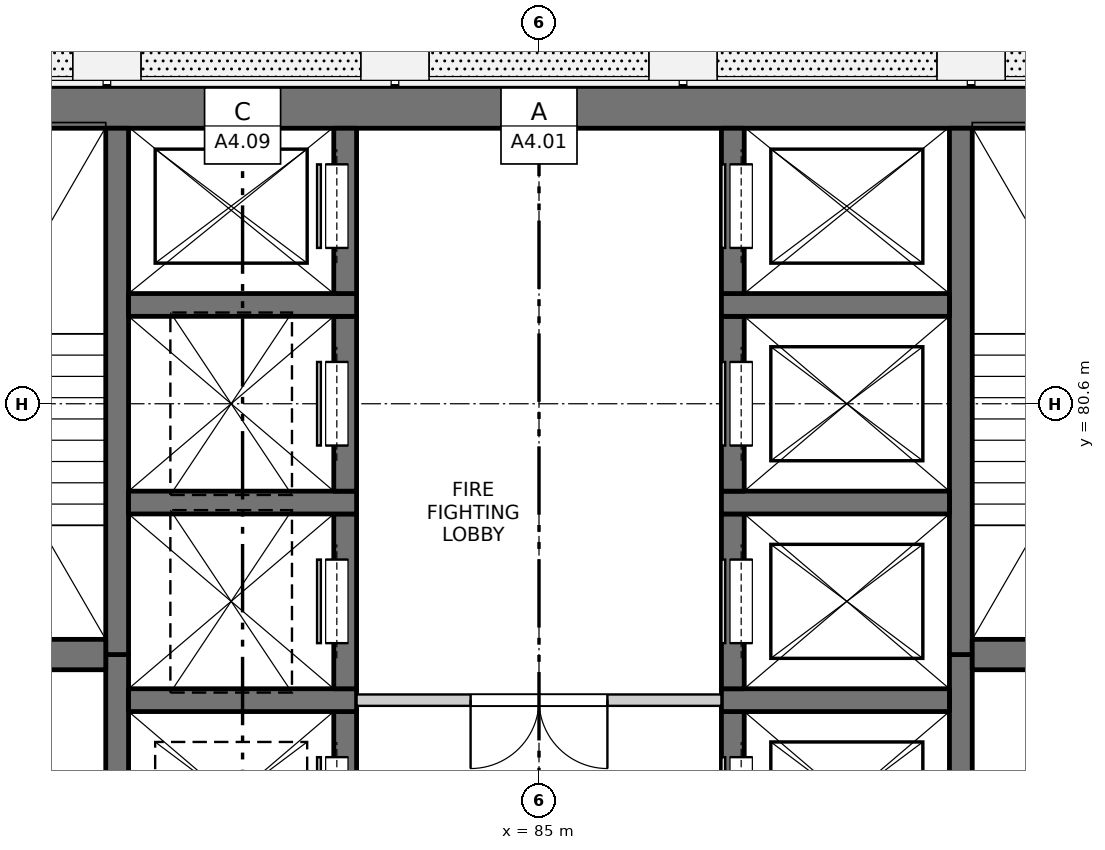
"""IFC4 building model, lengths in metres.
Left out: names, types, materials, properties, quantities, classifications, styles, units other than length and angle.
Written with IfcOpenShell. Run it as: python <this file> out.ifc"""

import sys

from ifc_helpers import new_model, si_unit, direction, frame, frame_2d, origin, place, context, subcontext, project, spatial, rectangle, extrude, element, fill, save


model = new_model("IFC4")
c1 = context("Model", 3, precision=1e-05, world=origin(), true_north=direction((0.0, 1.0)))
c2 = subcontext(c1, "Body", "Model", "MODEL_VIEW")
j1 = project(units=[si_unit("LENGTHUNIT", "METRE"), si_unit("PLANEANGLEUNIT", "RADIAN")], contexts=[c1])
p1 = place(None, origin())
s1 = spatial("IfcSite", under=j1, at=p1, CompositionType="ELEMENT")
p2 = place(p1, origin())
s2 = spatial("IfcBuilding", under=s1, at=p2, CompositionType="ELEMENT")
p3 = place(p2, frame((0.0, 0.0, 133.9)))
s3 = spatial("IfcBuildingStorey", under=s2, at=p3, CompositionType="ELEMENT", Elevation=133.9)
p4 = place(p3, frame((75.525, 84.5, -0.25), z_axis=(0.0, 0.0, 1.0), x_axis=(1.0, 0.0, 0.0)))
e1 = element("IfcWall", 1, at=p4, inside=s3, PredefinedType="SOLIDWALL", context=c2, shape_type="SweptSolid", body=[
    extrude(rectangle(XDim=18.95, YDim=0.55, at=frame_2d((9.475, 0.0))), origin(), (0.0, 0.0, 1.0), 3.4),
])
p5 = place(p3, frame((79.45, 60.95, -0.25), z_axis=(0.0, 0.0, 1.0), x_axis=(0.0, 1.0, 0.0)))
e2 = element("IfcWall", 2, at=p5, inside=s3, PredefinedType="SOLIDWALL", context=c2, shape_type="SweptSolid", body=[
    extrude(rectangle(XDim=16.35, YDim=0.3, at=frame_2d((8.175, 0.0))), origin(), (0.0, 0.0, 1.0), 3.4),
])
p6 = place(p3, frame((79.45, 77.3, -0.25), z_axis=(0.0, 0.0, 1.0), x_axis=(0.0, 1.0, 0.0)))
e3 = element("IfcWall", 3, at=p6, inside=s3, PredefinedType="SOLIDWALL", context=c2, shape_type="SweptSolid", body=[
    extrude(rectangle(XDim=6.925, YDim=0.3, at=frame_2d((3.462, 0.0))), origin(), (0.0, 0.0, 1.0), 3.4),
])
p7 = place(p3, frame((90.55, 61.95, -0.25), z_axis=(0.0, 0.0, 1.0), x_axis=(0.0, 1.0, 0.0)))
e4 = element("IfcWall", 4, at=p7, inside=s3, PredefinedType="SOLIDWALL", context=c2, shape_type="SweptSolid", body=[
    extrude(rectangle(XDim=15.35, YDim=0.3, at=frame_2d((7.675, 0.0))), origin(), (0.0, 0.0, 1.0), 3.4),
])
p8 = place(p3, frame((90.55, 77.3, -0.25), z_axis=(0.0, 0.0, 1.0), x_axis=(0.0, 1.0, 0.0)))
e5 = element("IfcWall", 5, at=p8, inside=s3, PredefinedType="SOLIDWALL", context=c2, shape_type="SweptSolid", body=[
    extrude(rectangle(XDim=6.925, YDim=0.3, at=frame_2d((3.462, 0.0))), origin(), (0.0, 0.0, 1.0), 3.4),
])
p9 = place(p3, frame((82.45, 74.25, -0.25), z_axis=(0.0, 0.0, 1.0), x_axis=(0.0, 1.0, 0.0)))
e6 = element("IfcWall", 6, at=p9, inside=s3, PredefinedType="SOLIDWALL", context=c2, shape_type="SweptSolid", body=[
    extrude(rectangle(XDim=2.3, YDim=0.3, at=frame_2d((1.15, 0.0))), origin(), (0.0, 0.0, 1.0), 3.4),
])
p10 = place(p9, frame((0.6, 0.0, 0.25)))
e7 = element("IfcOpeningElement", 7, at=p10, cuts=e6, PredefinedType="OPENING", context=c2, shape_type="SweptSolid", body=[
    extrude(rectangle(XDim=1.1, YDim=2.1, at=frame_2d((0.55, 1.05))), frame((0.0, 0.16, 0.0), z_axis=(0.0, -1.0, 0.0), x_axis=(1.0, 0.0, 0.0)), (0.0, 0.0, 1.0), 0.32),
])
p11 = place(p3, frame((79.6, 76.7, -0.25), z_axis=(0.0, 0.0, 1.0), x_axis=(1.0, 0.0, 0.0)))
e8 = element("IfcWall", 8, at=p11, inside=s3, PredefinedType="SOLIDWALL", context=c2, shape_type="SweptSolid", body=[
    extrude(rectangle(XDim=3.0, YDim=0.3, at=frame_2d((1.5, 0.0))), origin(), (0.0, 0.0, 1.0), 3.4),
])
p12 = place(p3, frame((82.45, 76.85, -0.25), z_axis=(0.0, 0.0, 1.0), x_axis=(0.0, 1.0, 0.0)))
e9 = element("IfcWall", 9, at=p12, inside=s3, PredefinedType="SOLIDWALL", context=c2, shape_type="SweptSolid", body=[
    extrude(rectangle(XDim=2.3, YDim=0.3, at=frame_2d((1.15, 0.0))), origin(), (0.0, 0.0, 1.0), 3.4),
])
p13 = place(p12, frame((0.6, 0.0, 0.25)))
e10 = element("IfcOpeningElement", 10, at=p13, cuts=e9, PredefinedType="OPENING", context=c2, shape_type="SweptSolid", body=[
    extrude(rectangle(XDim=1.1, YDim=2.1, at=frame_2d((0.55, 1.05))), frame((0.0, 0.16, 0.0), z_axis=(0.0, -1.0, 0.0), x_axis=(1.0, 0.0, 0.0)), (0.0, 0.0, 1.0), 0.32),
])
p14 = place(p3, frame((79.6, 79.3, -0.25), z_axis=(0.0, 0.0, 1.0), x_axis=(1.0, 0.0, 0.0)))
e11 = element("IfcWall", 11, at=p14, inside=s3, PredefinedType="SOLIDWALL", context=c2, shape_type="SweptSolid", body=[
    extrude(rectangle(XDim=3.0, YDim=0.3, at=frame_2d((1.5, 0.0))), origin(), (0.0, 0.0, 1.0), 3.4),
])
p15 = place(p3, frame((82.45, 79.45, -0.25), z_axis=(0.0, 0.0, 1.0), x_axis=(0.0, 1.0, 0.0)))
e12 = element("IfcWall", 12, at=p15, inside=s3, PredefinedType="SOLIDWALL", context=c2, shape_type="SweptSolid", body=[
    extrude(rectangle(XDim=2.3, YDim=0.3, at=frame_2d((1.15, 0.0))), origin(), (0.0, 0.0, 1.0), 3.4),
])
p16 = place(p15, frame((0.6, 0.0, 0.25)))
e13 = element("IfcOpeningElement", 13, at=p16, cuts=e12, PredefinedType="OPENING", context=c2, shape_type="SweptSolid", body=[
    extrude(rectangle(XDim=1.1, YDim=2.1, at=frame_2d((0.55, 1.05))), frame((0.0, 0.16, 0.0), z_axis=(0.0, -1.0, 0.0), x_axis=(1.0, 0.0, 0.0)), (0.0, 0.0, 1.0), 0.32),
])
p17 = place(p3, frame((79.6, 81.9, -0.25), z_axis=(0.0, 0.0, 1.0), x_axis=(1.0, 0.0, 0.0)))
e14 = element("IfcWall", 14, at=p17, inside=s3, PredefinedType="SOLIDWALL", context=c2, shape_type="SweptSolid", body=[
    extrude(rectangle(XDim=3.0, YDim=0.3, at=frame_2d((1.5, 0.0))), origin(), (0.0, 0.0, 1.0), 3.4),
])
p18 = place(p3, frame((82.45, 82.05, -0.25), z_axis=(0.0, 0.0, 1.0), x_axis=(0.0, 1.0, 0.0)))
e15 = element("IfcWall", 15, at=p18, inside=s3, PredefinedType="SOLIDWALL", context=c2, shape_type="SweptSolid", body=[
    extrude(rectangle(XDim=2.175, YDim=0.3, at=frame_2d((1.087, 0.0))), origin(), (0.0, 0.0, 1.0), 3.4),
])
p19 = place(p18, frame((0.6, 0.0, 0.25)))
e16 = element("IfcOpeningElement", 16, at=p19, cuts=e15, PredefinedType="OPENING", context=c2, shape_type="SweptSolid", body=[
    extrude(rectangle(XDim=1.1, YDim=2.1, at=frame_2d((0.55, 1.05))), frame((0.0, 0.16, 0.0), z_axis=(0.0, -1.0, 0.0), x_axis=(1.0, 0.0, 0.0)), (0.0, 0.0, 1.0), 0.32),
])
p20 = place(p3, frame((87.55, 74.25, -0.25), z_axis=(0.0, 0.0, 1.0), x_axis=(0.0, 1.0, 0.0)))
e17 = element("IfcWall", 17, at=p20, inside=s3, PredefinedType="SOLIDWALL", context=c2, shape_type="SweptSolid", body=[
    extrude(rectangle(XDim=2.3, YDim=0.3, at=frame_2d((1.15, 0.0))), origin(), (0.0, 0.0, 1.0), 3.4),
])
p21 = place(p20, frame((0.6, 0.0, 0.25)))
e18 = element("IfcOpeningElement", 18, at=p21, cuts=e17, PredefinedType="OPENING", context=c2, shape_type="SweptSolid", body=[
    extrude(rectangle(XDim=1.1, YDim=2.1, at=frame_2d((0.55, 1.05))), frame((0.0, 0.16, 0.0), z_axis=(0.0, -1.0, 0.0), x_axis=(1.0, 0.0, 0.0)), (0.0, 0.0, 1.0), 0.32),
])
p22 = place(p3, frame((87.4, 76.7, -0.25), z_axis=(0.0, 0.0, 1.0), x_axis=(1.0, 0.0, 0.0)))
e19 = element("IfcWall", 19, at=p22, inside=s3, PredefinedType="SOLIDWALL", context=c2, shape_type="SweptSolid", body=[
    extrude(rectangle(XDim=3.0, YDim=0.3, at=frame_2d((1.5, 0.0))), origin(), (0.0, 0.0, 1.0), 3.4),
])
p23 = place(p3, frame((87.55, 76.85, -0.25), z_axis=(0.0, 0.0, 1.0), x_axis=(0.0, 1.0, 0.0)))
e20 = element("IfcWall", 20, at=p23, inside=s3, PredefinedType="SOLIDWALL", context=c2, shape_type="SweptSolid", body=[
    extrude(rectangle(XDim=2.3, YDim=0.3, at=frame_2d((1.15, 0.0))), origin(), (0.0, 0.0, 1.0), 3.4),
])
p24 = place(p23, frame((0.6, 0.0, 0.25)))
e21 = element("IfcOpeningElement", 21, at=p24, cuts=e20, PredefinedType="OPENING", context=c2, shape_type="SweptSolid", body=[
    extrude(rectangle(XDim=1.1, YDim=2.1, at=frame_2d((0.55, 1.05))), frame((0.0, 0.16, 0.0), z_axis=(0.0, -1.0, 0.0), x_axis=(1.0, 0.0, 0.0)), (0.0, 0.0, 1.0), 0.32),
])
p25 = place(p3, frame((87.4, 79.3, -0.25), z_axis=(0.0, 0.0, 1.0), x_axis=(1.0, 0.0, 0.0)))
e22 = element("IfcWall", 22, at=p25, inside=s3, PredefinedType="SOLIDWALL", context=c2, shape_type="SweptSolid", body=[
    extrude(rectangle(XDim=3.0, YDim=0.3, at=frame_2d((1.5, 0.0))), origin(), (0.0, 0.0, 1.0), 3.4),
])
p26 = place(p3, frame((87.55, 79.45, -0.25), z_axis=(0.0, 0.0, 1.0), x_axis=(0.0, 1.0, 0.0)))
e23 = element("IfcWall", 23, at=p26, inside=s3, PredefinedType="SOLIDWALL", context=c2, shape_type="SweptSolid", body=[
    extrude(rectangle(XDim=2.3, YDim=0.3, at=frame_2d((1.15, 0.0))), origin(), (0.0, 0.0, 1.0), 3.4),
])
p27 = place(p26, frame((0.6, 0.0, 0.25)))
e24 = element("IfcOpeningElement", 24, at=p27, cuts=e23, PredefinedType="OPENING", context=c2, shape_type="SweptSolid", body=[
    extrude(rectangle(XDim=1.1, YDim=2.1, at=frame_2d((0.55, 1.05))), frame((0.0, 0.16, 0.0), z_axis=(0.0, -1.0, 0.0), x_axis=(1.0, 0.0, 0.0)), (0.0, 0.0, 1.0), 0.32),
])
p28 = place(p3, frame((87.4, 81.9, -0.25), z_axis=(0.0, 0.0, 1.0), x_axis=(1.0, 0.0, 0.0)))
e25 = element("IfcWall", 25, at=p28, inside=s3, PredefinedType="SOLIDWALL", context=c2, shape_type="SweptSolid", body=[
    extrude(rectangle(XDim=3.0, YDim=0.3, at=frame_2d((1.5, 0.0))), origin(), (0.0, 0.0, 1.0), 3.4),
])
p29 = place(p3, frame((87.55, 82.05, -0.25), z_axis=(0.0, 0.0, 1.0), x_axis=(0.0, 1.0, 0.0)))
e26 = element("IfcWall", 26, at=p29, inside=s3, PredefinedType="SOLIDWALL", context=c2, shape_type="SweptSolid", body=[
    extrude(rectangle(XDim=2.175, YDim=0.3, at=frame_2d((1.087, 0.0))), origin(), (0.0, 0.0, 1.0), 3.4),
])
p30 = place(p29, frame((0.6, 0.0, 0.25)))
e27 = element("IfcOpeningElement", 27, at=p30, cuts=e26, PredefinedType="OPENING", context=c2, shape_type="SweptSolid", body=[
    extrude(rectangle(XDim=1.1, YDim=2.1, at=frame_2d((0.55, 1.05))), frame((0.0, 0.16, 0.0), z_axis=(0.0, -1.0, 0.0), x_axis=(1.0, 0.0, 0.0)), (0.0, 0.0, 1.0), 0.32),
])
for number, where, z_axis, x_axis in (
    (28, (75.525, 77.3, -0.25), (0.0, 0.0, 1.0), (1.0, 0.0, 0.0)),
    (29, (90.7, 77.3, -0.25), (0.0, 0.0, 1.0), (1.0, 0.0, 0.0)),
):
    element("IfcWall", number, at=place(p3, frame(where, z_axis=z_axis, x_axis=x_axis)), inside=s3, PredefinedType="SOLIDWALL", context=c2, shape_type="SweptSolid", body=[
        extrude(rectangle(XDim=3.775, YDim=0.4, at=frame_2d((1.888, 0.0))), origin(), (0.0, 0.0, 1.0), 3.4),
    ])
p31 = place(p3, frame((82.6, 76.7, 0.0), z_axis=(0.0, 0.0, 1.0), x_axis=(1.0, 0.0, 0.0)))
e30 = element("IfcWall", 30, at=p31, inside=s3, PredefinedType="PARTITIONING", context=c2, shape_type="SweptSolid", body=[
    extrude(rectangle(XDim=4.8, YDim=0.15, at=frame_2d((2.4, 0.0))), origin(), (0.0, 0.0, 1.0), 3.15),
])
p32 = place(p31, frame((1.5, 0.0, 0.0)))
e31 = element("IfcOpeningElement", 31, at=p32, cuts=e30, PredefinedType="OPENING", context=c2, shape_type="SweptSolid", body=[
    extrude(rectangle(XDim=1.8, YDim=2.1, at=frame_2d((0.9, 1.05))), frame((0.0, 0.085, 0.0), z_axis=(0.0, -1.0, 0.0), x_axis=(1.0, 0.0, 0.0)), (0.0, 0.0, 1.0), 0.17),
])
p33 = place(p10, origin())
e32 = element("IfcDoor", 32, at=p33, inside=s3, OperationType="SLIDING_TO_LEFT", PredefinedType="DOOR", context=c2, shape_type="SweptSolid", body=[
    extrude(rectangle(XDim=1.1, YDim=2.1, at=frame_2d((0.55, 1.05))), frame((0.0, 0.135, 0.0), z_axis=(0.0, -1.0, 0.0), x_axis=(1.0, 0.0, 0.0)), (0.0, 0.0, 1.0), 0.05),
])
fill(e7, e32)
p34 = place(p21, origin())
e33 = element("IfcDoor", 33, at=p34, inside=s3, OperationType="SLIDING_TO_LEFT", PredefinedType="DOOR", context=c2, shape_type="SweptSolid", body=[
    extrude(rectangle(XDim=1.1, YDim=2.1, at=frame_2d((0.55, 1.05))), frame((0.0, -0.085, 0.0), z_axis=(0.0, -1.0, 0.0), x_axis=(1.0, 0.0, 0.0)), (0.0, 0.0, 1.0), 0.05),
])
fill(e18, e33)
p35 = place(p32, origin())
e34 = element("IfcDoor", 34, at=p35, inside=s3, OperationType="DOUBLE_DOOR_SINGLE_SWING", PredefinedType="DOOR", context=c2, shape_type="SweptSolid", body=[
    extrude(rectangle(XDim=1.8, YDim=2.1, at=frame_2d((0.9, 1.05))), frame((0.0, 0.025, 0.0), z_axis=(0.0, -1.0, 0.0), x_axis=(1.0, 0.0, 0.0)), (0.0, 0.0, 1.0), 0.05),
])
fill(e31, e34)
p36 = place(p13, origin())
e35 = element("IfcDoor", 35, at=p36, inside=s3, OperationType="SLIDING_TO_LEFT", PredefinedType="DOOR", context=c2, shape_type="SweptSolid", body=[
    extrude(rectangle(XDim=1.1, YDim=2.1, at=frame_2d((0.55, 1.05))), frame((0.0, 0.135, 0.0), z_axis=(0.0, -1.0, 0.0), x_axis=(1.0, 0.0, 0.0)), (0.0, 0.0, 1.0), 0.05),
])
fill(e10, e35)
p37 = place(p24, origin())
e36 = element("IfcDoor", 36, at=p37, inside=s3, OperationType="SLIDING_TO_LEFT", PredefinedType="DOOR", context=c2, shape_type="SweptSolid", body=[
    extrude(rectangle(XDim=1.1, YDim=2.1, at=frame_2d((0.55, 1.05))), frame((0.0, -0.085, 0.0), z_axis=(0.0, -1.0, 0.0), x_axis=(1.0, 0.0, 0.0)), (0.0, 0.0, 1.0), 0.05),
])
fill(e21, e36)
p38 = place(p16, origin())
e37 = element("IfcDoor", 37, at=p38, inside=s3, OperationType="SLIDING_TO_LEFT", PredefinedType="DOOR", context=c2, shape_type="SweptSolid", body=[
    extrude(rectangle(XDim=1.1, YDim=2.1, at=frame_2d((0.55, 1.05))), frame((0.0, 0.135, 0.0), z_axis=(0.0, -1.0, 0.0), x_axis=(1.0, 0.0, 0.0)), (0.0, 0.0, 1.0), 0.05),
])
fill(e13, e37)
p39 = place(p27, origin())
e38 = element("IfcDoor", 38, at=p39, inside=s3, OperationType="SLIDING_TO_RIGHT", PredefinedType="DOOR", context=c2, shape_type="SweptSolid", body=[
    extrude(rectangle(XDim=1.1, YDim=2.1, at=frame_2d((0.55, 1.05))), frame((0.0, -0.085, 0.0), z_axis=(0.0, -1.0, 0.0), x_axis=(1.0, 0.0, 0.0)), (0.0, 0.0, 1.0), 0.05),
])
fill(e24, e38)
p40 = place(p19, origin())
e39 = element("IfcDoor", 39, at=p40, inside=s3, OperationType="SLIDING_TO_RIGHT", PredefinedType="DOOR", context=c2, shape_type="SweptSolid", body=[
    extrude(rectangle(XDim=1.1, YDim=2.1, at=frame_2d((0.55, 1.05))), frame((0.0, 0.135, 0.0), z_axis=(0.0, -1.0, 0.0), x_axis=(1.0, 0.0, 0.0)), (0.0, 0.0, 1.0), 0.05),
])
fill(e16, e39)
p41 = place(p30, origin())
e40 = element("IfcDoor", 40, at=p41, inside=s3, OperationType="SLIDING_TO_RIGHT", PredefinedType="DOOR", context=c2, shape_type="SweptSolid", body=[
    extrude(rectangle(XDim=1.1, YDim=2.1, at=frame_2d((0.55, 1.05))), frame((0.0, -0.085, 0.0), z_axis=(0.0, -1.0, 0.0), x_axis=(1.0, 0.0, 0.0)), (0.0, 0.0, 1.0), 0.05),
])
fill(e27, e40)
save(model, sys.argv[1])
